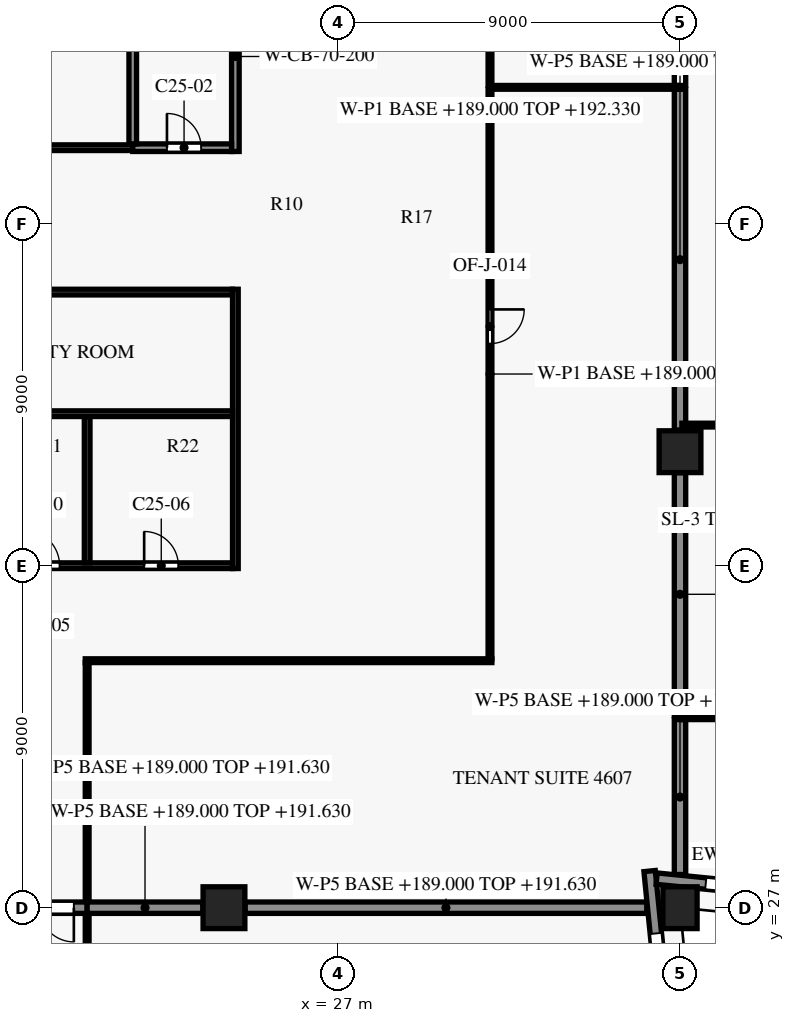
"""IFC4 building model, lengths in metres.
Left out: names, types, materials, properties, quantities, classifications, styles, units other than length and angle.
Written with IfcOpenShell. Run it as: python <this file> out.ifc"""

import sys

from ifc_helpers import new_model, si_unit, direction, frame, frame_2d, origin, origin_2d, place, context, subcontext, project, spatial, rectangle, extrude, element, fill, save


model = new_model("IFC4")
c1 = context("Model", 3, precision=1e-05, world=origin(), true_north=direction((0.0, 1.0)))
c2 = subcontext(c1, "Body", "Model", "MODEL_VIEW")
j1 = project(units=[si_unit("LENGTHUNIT", "METRE"), si_unit("PLANEANGLEUNIT", "RADIAN")], contexts=[c1])
p1 = place(None, origin())
s1 = spatial("IfcSite", under=j1, at=p1, CompositionType="ELEMENT")
p2 = place(p1, origin())
s2 = spatial("IfcBuilding", under=s1, at=p2, CompositionType="ELEMENT")
p3 = place(p2, frame((0.0, 0.0, 189.0)))
s3 = spatial("IfcBuildingStorey", under=s2, at=p3, CompositionType="ELEMENT", Elevation=189.0)
p4 = place(p3, frame((36.0, 27.0, 0.0), z_axis=(0.0, 0.0, 1.0), x_axis=(-0.0995038382, 0.995037178292, 0.0)))
e1 = element("IfcColumn", 1, at=p4, inside=s3, PredefinedType="COLUMN", context=c2, shape_type="SweptSolid", body=[
    extrude(rectangle(XDim=0.9, YDim=1.1, at=origin_2d()), origin(), (0.0, 0.0, 1.0), 3.8),
])
for number, where, z_axis, x_axis in (
    (2, (24.0, 27.0, 0.0), (0.0, 0.0, 1.0), (1.0, 0.0, 0.0)),
    (3, (36.0, 39.0, 0.0), (0.0, 0.0, 1.0), (1.0, 0.0, 0.0)),
):
    element("IfcColumn", number, at=place(p3, frame(where, z_axis=z_axis, x_axis=x_axis)), inside=s3, PredefinedType="COLUMN", context=c2, shape_type="SweptSolid", body=[
        extrude(rectangle(XDim=1.1, YDim=1.1, at=origin_2d()), origin(), (0.0, 0.0, 1.0), 3.8),
    ])
p5 = place(p3, frame((35.2, 27.964, 0.0), z_axis=(0.0, 0.0, 1.0), x_axis=(0.099501297882, -0.995037432321, 0.0)))
e4 = element("IfcWall", 4, at=p5, inside=s3, PredefinedType="SOLIDWALL", context=c2, shape_type="SweptSolid", body=[
    extrude(rectangle(XDim=9.984, YDim=0.3, at=frame_2d((4.992, 0.0))), origin(), (0.0, 0.0, 1.0), 3.0),
])
p6 = place(p5, frame((1.65, 0.0, 0.15)))
e5 = element("IfcOpeningElement", 5, at=p6, cuts=e4, PredefinedType="OPENING", context=c2, shape_type="SweptSolid", body=[
    extrude(rectangle(XDim=3.3, YDim=2.4, at=frame_2d((1.65, 1.2))), frame((0.0, 0.16, 0.0), z_axis=(0.0, -1.0, 0.0), x_axis=(1.0, 0.0, 0.0)), (0.0, 0.0, 1.0), 0.32),
])
p7 = place(p5, frame((6.923, 0.0, 0.75)))
e6 = element("IfcOpeningElement", 6, at=p7, cuts=e4, PredefinedType="OPENING", context=c2, shape_type="SweptSolid", body=[
    extrude(rectangle(XDim=1.8, YDim=1.8, at=frame_2d((0.9, 0.9))), frame((0.0, 0.16, 0.0), z_axis=(0.0, -1.0, 0.0), x_axis=(1.0, 0.0, 0.0)), (0.0, 0.0, 1.0), 0.32),
])
p8 = place(p3, frame((45.015, 26.802, 0.0), z_axis=(0.0, 0.0, 1.0), x_axis=(-0.995037689759, 0.099498723402, 0.0)))
e7 = element("IfcWall", 7, at=p8, inside=s3, PredefinedType="SOLIDWALL", context=c2, shape_type="SweptSolid", body=[
    extrude(rectangle(XDim=9.677, YDim=0.3, at=frame_2d((4.839, 0.0))), origin(), (0.0, 0.0, 1.0), 3.0),
])
p9 = place(p8, frame((1.306, 0.0, 0.75)))
e8 = element("IfcOpeningElement", 8, at=p9, cuts=e7, PredefinedType="OPENING", context=c2, shape_type="SweptSolid", body=[
    extrude(rectangle(XDim=1.8, YDim=1.8, at=frame_2d((0.9, 0.9))), frame((0.0, 0.16, 0.0), z_axis=(0.0, -1.0, 0.0), x_axis=(1.0, 0.0, 0.0)), (0.0, 0.0, 1.0), 0.32),
])
p10 = place(p8, frame((5.079, 0.0, 0.15)))
e9 = element("IfcOpeningElement", 9, at=p10, cuts=e7, PredefinedType="OPENING", context=c2, shape_type="SweptSolid", body=[
    extrude(rectangle(XDim=3.3, YDim=2.4, at=frame_2d((1.65, 1.2))), frame((0.0, 0.16, 0.0), z_axis=(0.0, -1.0, 0.0), x_axis=(1.0, 0.0, 0.0)), (0.0, 0.0, 1.0), 0.32),
])
p11 = place(p3, frame((12.4, 36.0, 0.0), z_axis=(0.0, 0.0, 1.0), x_axis=(1.0, 0.0, 0.0)))
e10 = element("IfcWall", 10, at=p11, inside=s3, PredefinedType="SHEAR", context=c2, shape_type="SweptSolid", body=[
    extrude(rectangle(XDim=11.825, YDim=0.15, at=frame_2d((5.913, 0.0))), origin(), (0.0, 0.0, 1.0), 3.5),
])
p12 = place(p11, frame((0.95, 0.0, 0.0)))
e11 = element("IfcOpeningElement", 11, at=p12, cuts=e10, PredefinedType="OPENING", context=c2, shape_type="SweptSolid", body=[
    extrude(rectangle(XDim=0.9, YDim=2.1, at=frame_2d((0.45, 1.05))), frame((0.0, 0.085, 0.0), z_axis=(0.0, -1.0, 0.0), x_axis=(1.0, 0.0, 0.0)), (0.0, 0.0, 1.0), 0.17),
])
p13 = place(p11, frame((3.75, 0.0, 0.0)))
e12 = element("IfcOpeningElement", 12, at=p13, cuts=e10, PredefinedType="OPENING", context=c2, shape_type="SweptSolid", body=[
    extrude(rectangle(XDim=0.9, YDim=2.1, at=frame_2d((0.45, 1.05))), frame((0.0, 0.085, 0.0), z_axis=(0.0, -1.0, 0.0), x_axis=(1.0, 0.0, 0.0)), (0.0, 0.0, 1.0), 0.17),
])
p14 = place(p11, frame((6.325, 0.0, 0.0)))
e13 = element("IfcOpeningElement", 13, at=p14, cuts=e10, PredefinedType="OPENING", context=c2, shape_type="SweptSolid", body=[
    extrude(rectangle(XDim=0.95, YDim=2.1, at=frame_2d((0.475, 1.05))), frame((0.0, 0.085, 0.0), z_axis=(0.0, -1.0, 0.0), x_axis=(1.0, 0.0, 0.0)), (0.0, 0.0, 1.0), 0.17),
])
p15 = place(p11, frame((9.5, 0.0, 0.0)))
e14 = element("IfcOpeningElement", 14, at=p15, cuts=e10, PredefinedType="OPENING", context=c2, shape_type="SweptSolid", body=[
    extrude(rectangle(XDim=0.9, YDim=2.1, at=frame_2d((0.45, 1.05))), frame((0.0, 0.085, 0.0), z_axis=(0.0, -1.0, 0.0), x_axis=(1.0, 0.0, 0.0)), (0.0, 0.0, 1.0), 0.17),
])
p16 = place(p3, frame((8.1, 40.0, 0.0), z_axis=(0.0, 0.0, 1.0), x_axis=(1.0, 0.0, 0.0)))
e15 = element("IfcWall", 15, at=p16, inside=s3, PredefinedType="PARTITIONING", context=c2, shape_type="SweptSolid", body=[
    extrude(rectangle(XDim=16.125, YDim=0.15, at=frame_2d((8.062, 0.0))), origin(), (0.0, 0.0, 1.0), 3.35),
])
p17 = place(p3, frame((8.1, 43.2, 0.0), z_axis=(0.0, 0.0, 1.0), x_axis=(1.0, 0.0, 0.0)))
e16 = element("IfcWall", 16, at=p17, inside=s3, PredefinedType="PARTITIONING", context=c2, shape_type="SweptSolid", body=[
    extrude(rectangle(XDim=16.125, YDim=0.15, at=frame_2d((8.062, 0.0))), origin(), (0.0, 0.0, 1.0), 3.35),
])
p18 = place(p17, frame((1.925, 0.0, 0.0)))
e17 = element("IfcOpeningElement", 17, at=p18, cuts=e16, PredefinedType="OPENING", context=c2, shape_type="SweptSolid", body=[
    extrude(rectangle(XDim=0.9, YDim=2.1, at=frame_2d((0.45, 1.05))), frame((0.0, 0.085, 0.0), z_axis=(0.0, -1.0, 0.0), x_axis=(1.0, 0.0, 0.0)), (0.0, 0.0, 1.0), 0.17),
])
p19 = place(p17, frame((10.025, 0.0, 0.0)))
e18 = element("IfcOpeningElement", 18, at=p19, cuts=e16, PredefinedType="OPENING", context=c2, shape_type="SweptSolid", body=[
    extrude(rectangle(XDim=0.9, YDim=2.1, at=frame_2d((0.45, 1.05))), frame((0.0, 0.085, 0.0), z_axis=(0.0, -1.0, 0.0), x_axis=(1.0, 0.0, 0.0)), (0.0, 0.0, 1.0), 0.17),
])
p20 = place(p3, frame((8.1, 47.0, 0.0), z_axis=(0.0, 0.0, 1.0), x_axis=(1.0, 0.0, 0.0)))
e19 = element("IfcWall", 19, at=p20, inside=s3, PredefinedType="PARTITIONING", context=c2, shape_type="SweptSolid", body=[
    extrude(rectangle(XDim=13.5, YDim=0.15, at=frame_2d((6.75, 0.0))), origin(), (0.0, 0.0, 1.0), 3.35),
])
p21 = place(p20, frame((1.525, 0.0, 0.0)))
e20 = element("IfcOpeningElement", 20, at=p21, cuts=e19, PredefinedType="OPENING", context=c2, shape_type="SweptSolid", body=[
    extrude(rectangle(XDim=0.9, YDim=2.1, at=frame_2d((0.45, 1.05))), frame((0.0, 0.085, 0.0), z_axis=(0.0, -1.0, 0.0), x_axis=(1.0, 0.0, 0.0)), (0.0, 0.0, 1.0), 0.17),
])
p22 = place(p20, frame((8.275, 0.0, 0.0)))
e21 = element("IfcOpeningElement", 21, at=p22, cuts=e19, PredefinedType="OPENING", context=c2, shape_type="SweptSolid", body=[
    extrude(rectangle(XDim=0.9, YDim=2.1, at=frame_2d((0.45, 1.05))), frame((0.0, 0.085, 0.0), z_axis=(0.0, -1.0, 0.0), x_axis=(1.0, 0.0, 0.0)), (0.0, 0.0, 1.0), 0.17),
])
p23 = place(p3, frame((21.6, 47.0, 0.0), z_axis=(0.0, 0.0, 1.0), x_axis=(1.0, 0.0, 0.0)))
e22 = element("IfcWall", 22, at=p23, inside=s3, PredefinedType="PARTITIONING", context=c2, shape_type="SweptSolid", body=[
    extrude(rectangle(XDim=2.6, YDim=0.2, at=frame_2d((1.3, 0.0))), origin(), (0.0, 0.0, 1.0), 3.35),
])
p24 = place(p23, frame((0.9, 0.0, 0.0)))
e23 = element("IfcOpeningElement", 23, at=p24, cuts=e22, PredefinedType="OPENING", context=c2, shape_type="SweptSolid", body=[
    extrude(rectangle(XDim=0.9, YDim=2.1, at=frame_2d((0.45, 1.05))), frame((0.0, 0.11, 0.0), z_axis=(0.0, -1.0, 0.0), x_axis=(1.0, 0.0, 0.0)), (0.0, 0.0, 1.0), 0.22),
])
p25 = place(p3, frame((20.4, 36.075, 0.0), z_axis=(0.0, 0.0, 1.0), x_axis=(0.0, 1.0, 0.0)))
e24 = element("IfcWall", 24, at=p25, inside=s3, PredefinedType="PARTITIONING", context=c2, shape_type="SweptSolid", body=[
    extrude(rectangle(XDim=3.85, YDim=0.15, at=frame_2d((1.925, 0.0))), origin(), (0.0, 0.0, 1.0), 3.35),
])
p26 = place(p3, frame((21.6, 47.1, 0.0), z_axis=(0.0, 0.0, 1.0), x_axis=(0.0, 1.0, 0.0)))
e25 = element("IfcWall", 25, at=p26, inside=s3, PredefinedType="PARTITIONING", context=c2, shape_type="SweptSolid", body=[
    extrude(rectangle(XDim=4.6, YDim=0.2, at=frame_2d((2.3, 0.0))), origin(), (0.0, 0.0, 1.0), 3.35),
])
p27 = place(p3, frame((24.3, 35.925, 0.0), z_axis=(0.0, 0.0, 1.0), x_axis=(0.0, 1.0, 0.0)))
e26 = element("IfcWall", 26, at=p27, inside=s3, PredefinedType="PARTITIONING", context=c2, shape_type="SweptSolid", body=[
    extrude(rectangle(XDim=7.35, YDim=0.15, at=frame_2d((3.675, 0.0))), origin(), (0.0, 0.0, 1.0), 3.35),
])
p28 = place(p3, frame((24.3, 46.9, 0.0), z_axis=(0.0, 0.0, 1.0), x_axis=(0.0, 1.0, 0.0)))
e27 = element("IfcWall", 27, at=p28, inside=s3, PredefinedType="SHEAR", context=c2, shape_type="SweptSolid", body=[
    extrude(rectangle(XDim=5.0, YDim=0.2, at=frame_2d((2.5, 0.0))), origin(), (0.0, 0.0, 1.0), 3.5),
])
p29 = place(p3, frame((20.4, 26.83, 0.0), z_axis=(0.0, 0.0, 1.0), x_axis=(0.0, -1.0, 0.0)))
e28 = element("IfcWall", 28, at=p29, inside=s3, PredefinedType="PARTITIONING", context=c2, shape_type="SweptSolid", body=[
    extrude(rectangle(XDim=14.48, YDim=0.1, at=frame_2d((7.24, 0.0))), origin(), (0.0, 0.0, 1.0), 2.63),
])
p30 = place(p29, frame((6.73, 0.0, 0.0)))
e29 = element("IfcOpeningElement", 29, at=p30, cuts=e28, PredefinedType="OPENING", context=c2, shape_type="SweptSolid", body=[
    extrude(rectangle(XDim=0.9, YDim=2.1, at=frame_2d((0.45, 1.05))), frame((0.0, 0.06, 0.0), z_axis=(0.0, -1.0, 0.0), x_axis=(1.0, 0.0, 0.0)), (0.0, 0.0, 1.0), 0.12),
])
p31 = place(p3, frame((20.4, 27.0, 0.0), z_axis=(0.0, 0.0, 1.0), x_axis=(-1.0, 0.0, 0.0)))
e30 = element("IfcWall", 30, at=p31, inside=s3, PredefinedType="PARTITIONING", context=c2, shape_type="SweptSolid", body=[
    extrude(rectangle(XDim=2.5, YDim=0.3, at=frame_2d((1.25, 0.0))), origin(), (0.0, 0.0, 1.0), 2.63),
])
p32 = place(p31, frame((0.35, 0.0, 0.0)))
e31 = element("IfcOpeningElement", 31, at=p32, cuts=e30, PredefinedType="OPENING", context=c2, shape_type="SweptSolid", body=[
    extrude(rectangle(XDim=1.8, YDim=2.1, at=frame_2d((0.9, 1.05))), frame((0.0, 0.16, 0.0), z_axis=(0.0, -1.0, 0.0), x_axis=(1.0, 0.0, 0.0)), (0.0, 0.0, 1.0), 0.32),
])
p33 = place(p3, frame((20.4, 27.0, 0.0), z_axis=(0.0, 0.0, 1.0), x_axis=(1.0, 0.0, 0.0)))
e32 = element("IfcWall", 32, at=p33, inside=s3, PredefinedType="PARTITIONING", context=c2, shape_type="SweptSolid", body=[
    extrude(rectangle(XDim=3.045, YDim=0.3, at=frame_2d((1.522, 0.0))), origin(), (0.0, 0.0, 1.0), 2.63),
])
p34 = place(p3, frame((24.555, 27.0, 0.0), z_axis=(0.0, 0.0, 1.0), x_axis=(1.0, 0.0, 0.0)))
e33 = element("IfcWall", 33, at=p34, inside=s3, PredefinedType="PARTITIONING", context=c2, shape_type="SweptSolid", body=[
    extrude(rectangle(XDim=10.571, YDim=0.3, at=frame_2d((5.285, 0.0))), origin(), (0.0, 0.0, 1.0), 2.63),
])
p35 = place(p3, frame((36.0, 27.874, 0.0), z_axis=(0.0, 0.0, 1.0), x_axis=(0.0, 1.0, 0.0)))
e34 = element("IfcWall", 34, at=p35, inside=s3, PredefinedType="PARTITIONING", context=c2, shape_type="SweptSolid", body=[
    extrude(rectangle(XDim=4.076, YDim=0.3, at=frame_2d((2.038, 0.0))), origin(), (0.0, 0.0, 1.0), 2.63),
])
p36 = place(p3, frame((44.95, 32.0, 0.0), z_axis=(0.0, 0.0, 1.0), x_axis=(-1.0, 0.0, 0.0)))
e35 = element("IfcWall", 35, at=p36, inside=s3, PredefinedType="PARTITIONING", context=c2, shape_type="SweptSolid", body=[
    extrude(rectangle(XDim=8.9, YDim=0.1, at=frame_2d((4.45, 0.0))), origin(), (0.0, 0.0, 1.0), 2.63),
])
p37 = place(p36, frame((4.0, 0.0, 0.0)))
e36 = element("IfcOpeningElement", 36, at=p37, cuts=e35, PredefinedType="OPENING", context=c2, shape_type="SweptSolid", body=[
    extrude(rectangle(XDim=0.9, YDim=2.1, at=frame_2d((0.45, 1.05))), frame((0.0, 0.06, 0.0), z_axis=(0.0, -1.0, 0.0), x_axis=(1.0, 0.0, 0.0)), (0.0, 0.0, 1.0), 0.12),
])
p38 = place(p3, frame((36.0, 32.05, 0.0), z_axis=(0.0, 0.0, 1.0), x_axis=(0.0, 1.0, 0.0)))
e37 = element("IfcWall", 37, at=p38, inside=s3, PredefinedType="PARTITIONING", context=c2, shape_type="SweptSolid", body=[
    extrude(rectangle(XDim=6.395, YDim=0.3, at=frame_2d((3.198, 0.0))), origin(), (0.0, 0.0, 1.0), 2.63),
])
p39 = place(p3, frame((20.4, 33.45, 0.0), z_axis=(0.0, 0.0, 1.0), x_axis=(0.0, -1.0, 0.0)))
e38 = element("IfcWall", 38, at=p39, inside=s3, PredefinedType="PARTITIONING", context=c2, shape_type="SweptSolid", body=[
    extrude(rectangle(XDim=6.28, YDim=0.1, at=frame_2d((3.14, 0.0))), origin(), (0.0, 0.0, 1.0), 2.63),
])
p40 = place(p3, frame((31.05, 33.5, 0.0), z_axis=(0.0, 0.0, 1.0), x_axis=(-1.0, 0.0, 0.0)))
e39 = element("IfcWall", 39, at=p40, inside=s3, PredefinedType="PARTITIONING", context=c2, shape_type="SweptSolid", body=[
    extrude(rectangle(XDim=10.7, YDim=0.1, at=frame_2d((5.35, 0.0))), origin(), (0.0, 0.0, 1.0), 2.63),
])
p41 = place(p3, frame((45.0, 39.7, 0.0), z_axis=(0.0, 0.0, 1.0), x_axis=(-1.0, 0.0, 0.0)))
e40 = element("IfcWall", 40, at=p41, inside=s3, PredefinedType="PARTITIONING", context=c2, shape_type="SweptSolid", body=[
    extrude(rectangle(XDim=8.95, YDim=0.1, at=frame_2d((4.475, 0.0))), origin(), (0.0, 0.0, 1.0), 2.63),
])
p42 = place(p41, frame((4.05, 0.0, 0.0)))
e41 = element("IfcOpeningElement", 41, at=p42, cuts=e40, PredefinedType="OPENING", context=c2, shape_type="SweptSolid", body=[
    extrude(rectangle(XDim=0.9, YDim=2.1, at=frame_2d((0.45, 1.05))), frame((0.0, 0.06, 0.0), z_axis=(0.0, -1.0, 0.0), x_axis=(1.0, 0.0, 0.0)), (0.0, 0.0, 1.0), 0.12),
])
p43 = place(p3, frame((36.0, 39.57, 0.0), z_axis=(0.0, 0.0, 1.0), x_axis=(0.0, 1.0, 0.0)))
e42 = element("IfcWall", 42, at=p43, inside=s3, PredefinedType="PARTITIONING", context=c2, shape_type="SweptSolid", body=[
    extrude(rectangle(XDim=8.968, YDim=0.3, at=frame_2d((4.484, 0.0))), origin(), (0.0, 0.0, 1.0), 2.63),
])
p44 = place(p3, frame((31.0, 48.538, 0.0), z_axis=(0.0, 0.0, 1.0), x_axis=(0.0, -1.0, 0.0)))
e43 = element("IfcWall", 43, at=p44, inside=s3, PredefinedType="PARTITIONING", context=c2, shape_type="SweptSolid", body=[
    extrude(rectangle(XDim=14.988, YDim=0.1, at=frame_2d((7.494, 0.0))), origin(), (0.0, 0.0, 1.0), 3.33),
])
p45 = place(p44, frame((5.794, 0.0, 0.0)))
e44 = element("IfcOpeningElement", 44, at=p45, cuts=e43, PredefinedType="OPENING", context=c2, shape_type="SweptSolid", body=[
    extrude(rectangle(XDim=0.9, YDim=2.1, at=frame_2d((0.45, 1.05))), frame((0.0, 0.06, 0.0), z_axis=(0.0, -1.0, 0.0), x_axis=(1.0, 0.0, 0.0)), (0.0, 0.0, 1.0), 0.12),
])
p46 = place(p3, frame((31.05, 48.588, 0.0), z_axis=(0.0, 0.0, 1.0), x_axis=(1.0, 0.0, 0.0)))
e45 = element("IfcWall", 45, at=p46, inside=s3, PredefinedType="PARTITIONING", context=c2, shape_type="SweptSolid", body=[
    extrude(rectangle(XDim=4.9, YDim=0.1, at=frame_2d((2.45, 0.0))), origin(), (0.0, 0.0, 1.0), 2.63),
])
p47 = place(p3, frame((36.0, 48.638, 0.0), z_axis=(0.0, 0.0, 1.0), x_axis=(0.0, 1.0, 0.0)))
e46 = element("IfcWall", 46, at=p47, inside=s3, PredefinedType="PARTITIONING", context=c2, shape_type="SweptSolid", body=[
    extrude(rectangle(XDim=1.807, YDim=0.3, at=frame_2d((0.904, 0.0))), origin(), (0.0, 0.0, 1.0), 2.63),
])
p48 = place(p3, frame((31.0, 54.95, 0.0), z_axis=(0.0, 0.0, 1.0), x_axis=(0.0, -1.0, 0.0)))
e47 = element("IfcWall", 47, at=p48, inside=s3, PredefinedType="PARTITIONING", context=c2, shape_type="SweptSolid", body=[
    extrude(rectangle(XDim=6.312, YDim=0.1, at=frame_2d((3.156, 0.0))), origin(), (0.0, 0.0, 1.0), 3.33),
])
p49 = place(p48, frame((2.706, 0.0, 0.0)))
e48 = element("IfcOpeningElement", 48, at=p49, cuts=e47, PredefinedType="OPENING", context=c2, shape_type="SweptSolid", body=[
    extrude(rectangle(XDim=0.9, YDim=2.1, at=frame_2d((0.45, 1.05))), frame((0.0, 0.06, 0.0), z_axis=(0.0, -1.0, 0.0), x_axis=(1.0, 0.0, 0.0)), (0.0, 0.0, 1.0), 0.12),
])
p50 = place(p6, origin())
e49 = element("IfcWindow", 49, at=p50, inside=s3, PartitioningType="SINGLE_PANEL", PredefinedType="WINDOW", context=c2, shape_type="SweptSolid", body=[
    extrude(rectangle(XDim=3.3, YDim=2.4, at=frame_2d((1.65, 1.2))), frame((0.0, 0.03, 0.0), z_axis=(0.0, -1.0, 0.0), x_axis=(1.0, 0.0, 0.0)), (0.0, 0.0, 1.0), 0.06),
])
fill(e5, e49)
p51 = place(p10, origin())
e50 = element("IfcWindow", 50, at=p51, inside=s3, PartitioningType="SINGLE_PANEL", PredefinedType="WINDOW", context=c2, shape_type="SweptSolid", body=[
    extrude(rectangle(XDim=3.3, YDim=2.4, at=frame_2d((1.65, 1.2))), frame((0.0, 0.03, 0.0), z_axis=(0.0, -1.0, 0.0), x_axis=(1.0, 0.0, 0.0)), (0.0, 0.0, 1.0), 0.06),
])
fill(e9, e50)
p52 = place(p24, origin())
e51 = element("IfcDoor", 51, at=p52, inside=s3, OperationType="SINGLE_SWING_LEFT", PredefinedType="DOOR", context=c2, shape_type="SweptSolid", body=[
    extrude(rectangle(XDim=0.9, YDim=2.1, at=frame_2d((0.45, 1.05))), frame((0.0, 0.025, 0.0), z_axis=(0.0, -1.0, 0.0), x_axis=(1.0, 0.0, 0.0)), (0.0, 0.0, 1.0), 0.05),
])
fill(e23, e51)
p53 = place(p14, origin())
e52 = element("IfcDoor", 52, at=p53, inside=s3, OperationType="SINGLE_SWING_RIGHT", PredefinedType="DOOR", context=c2, shape_type="SweptSolid", body=[
    extrude(rectangle(XDim=0.95, YDim=2.1, at=frame_2d((0.475, 1.05))), frame((0.0, 0.025, 0.0), z_axis=(0.0, -1.0, 0.0), x_axis=(1.0, 0.0, 0.0)), (0.0, 0.0, 1.0), 0.05),
])
fill(e13, e52)
p54 = place(p15, origin())
e53 = element("IfcDoor", 53, at=p54, inside=s3, OperationType="SINGLE_SWING_LEFT", PredefinedType="DOOR", context=c2, shape_type="SweptSolid", body=[
    extrude(rectangle(XDim=0.9, YDim=2.1, at=frame_2d((0.45, 1.05))), frame((0.0, 0.025, 0.0), z_axis=(0.0, -1.0, 0.0), x_axis=(1.0, 0.0, 0.0)), (0.0, 0.0, 1.0), 0.05),
])
fill(e14, e53)
p55 = place(p45, origin())
e54 = element("IfcDoor", 54, at=p55, inside=s3, OperationType="SINGLE_SWING_RIGHT", PredefinedType="DOOR", context=c2, shape_type="SweptSolid", body=[
    extrude(rectangle(XDim=0.9, YDim=2.1, at=frame_2d((0.45, 1.05))), frame((0.0, 0.025, 0.0), z_axis=(0.0, -1.0, 0.0), x_axis=(1.0, 0.0, 0.0)), (0.0, 0.0, 1.0), 0.05),
])
fill(e44, e54)
p56 = place(p32, origin())
e55 = element("IfcDoor", 55, at=p56, inside=s3, OperationType="DOUBLE_DOOR_SINGLE_SWING", PredefinedType="DOOR", context=c2, shape_type="SweptSolid", body=[
    extrude(rectangle(XDim=1.8, YDim=2.1, at=frame_2d((0.9, 1.05))), frame((0.0, 0.025, 0.0), z_axis=(0.0, -1.0, 0.0), x_axis=(1.0, 0.0, 0.0)), (0.0, 0.0, 1.0), 0.05),
])
fill(e31, e55)
save(model, sys.argv[1])
